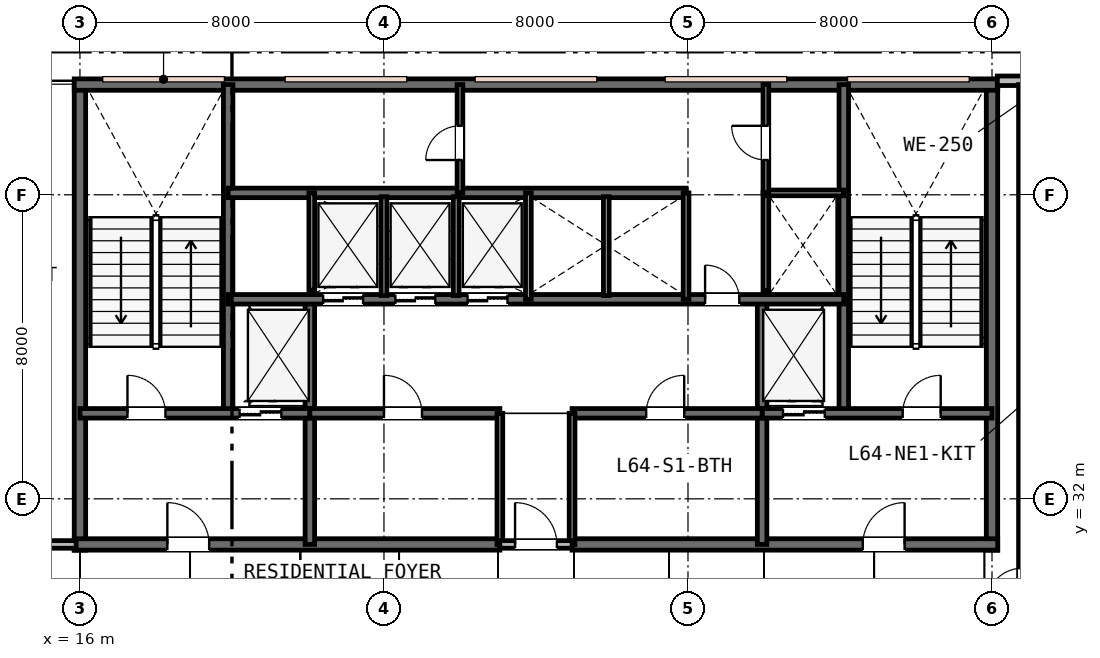
"""IFC4 building model, lengths in metres.
Left out: names, types, materials, properties, quantities, classifications, styles, units other than length and angle.
Written with IfcOpenShell. Run it as: python <this file> out.ifc"""

import sys

from ifc_helpers import new_model, si_unit, direction, frame, frame_2d, origin, place, context, subcontext, project, spatial, rectangle, extrude, element, fill, save


model = new_model("IFC4")
c1 = context("Model", 3, precision=1e-05, world=origin(), true_north=direction((0.0, 1.0)))
c2 = subcontext(c1, "Body", "Model", "MODEL_VIEW")
j1 = project(units=[si_unit("LENGTHUNIT", "METRE"), si_unit("PLANEANGLEUNIT", "RADIAN")], contexts=[c1])
p1 = place(None, origin())
s1 = spatial("IfcSite", under=j1, at=p1, CompositionType="ELEMENT")
p2 = place(p1, origin())
s2 = spatial("IfcBuilding", under=s1, at=p2, CompositionType="ELEMENT")
p3 = place(p2, frame((0.0, 0.0, 248.8)))
s3 = spatial("IfcBuildingStorey", under=s2, at=p3, CompositionType="ELEMENT", Elevation=248.8)
for number, where, z_axis, x_axis in (
    (1, (16.0, 30.65, 0.0), (0.0, 0.0, 1.0), (0.0, 1.0, 0.0)),
    (2, (40.0, 30.65, 0.0), (0.0, 0.0, 1.0), (0.0, 1.0, 0.0)),
):
    element("IfcWall", number, at=place(p3, frame(where, z_axis=z_axis, x_axis=x_axis)), inside=s3, PredefinedType="SHEAR", context=c2, shape_type="SweptSolid", body=[
        extrude(rectangle(XDim=12.3, YDim=0.3, at=frame_2d((6.15, 0.0))), origin(), (0.0, 0.0, 1.0), 3.8),
    ])
p4 = place(p3, frame((15.85, 42.9, 0.0), z_axis=(0.0, 0.0, 1.0), x_axis=(1.0, 0.0, 0.0)))
e3 = element("IfcWall", 3, at=p4, inside=s3, PredefinedType="SHEAR", context=c2, shape_type="SweptSolid", body=[
    extrude(rectangle(XDim=24.3, YDim=0.3, at=frame_2d((12.15, 0.0))), origin(), (0.0, 0.0, 1.0), 3.8),
])
p5 = place(p3, frame((15.85, 30.8, 0.0), z_axis=(0.0, 0.0, 1.0), x_axis=(1.0, 0.0, 0.0)))
e4 = element("IfcWall", 4, at=p5, inside=s3, PredefinedType="SHEAR", context=c2, shape_type="SweptSolid", body=[
    extrude(rectangle(XDim=11.2, YDim=0.3, at=frame_2d((5.6, 0.0))), origin(), (0.0, 0.0, 1.0), 3.8),
])
p6 = place(p5, frame((2.45, 0.0, 0.0)))
e5 = element("IfcOpeningElement", 5, at=p6, cuts=e4, PredefinedType="OPENING", context=c2, shape_type="SweptSolid", body=[
    extrude(rectangle(XDim=1.1, YDim=2.15, at=frame_2d((0.55, 1.075))), frame((0.0, 0.16, 0.0), z_axis=(0.0, -1.0, 0.0), x_axis=(1.0, 0.0, 0.0)), (0.0, 0.0, 1.0), 0.32),
])
p7 = place(p3, frame((28.95, 30.8, 0.0), z_axis=(0.0, 0.0, 1.0), x_axis=(1.0, 0.0, 0.0)))
e6 = element("IfcWall", 6, at=p7, inside=s3, PredefinedType="SHEAR", context=c2, shape_type="SweptSolid", body=[
    extrude(rectangle(XDim=11.2, YDim=0.3, at=frame_2d((5.6, 0.0))), origin(), (0.0, 0.0, 1.0), 3.8),
])
p8 = place(p7, frame((7.65, 0.0, 0.0)))
e7 = element("IfcOpeningElement", 7, at=p8, cuts=e6, PredefinedType="OPENING", context=c2, shape_type="SweptSolid", body=[
    extrude(rectangle(XDim=1.1, YDim=2.15, at=frame_2d((0.55, 1.075))), frame((0.0, 0.16, 0.0), z_axis=(0.0, -1.0, 0.0), x_axis=(1.0, 0.0, 0.0)), (0.0, 0.0, 1.0), 0.32),
])
for number, where, z_axis, x_axis in (
    (8, (19.9, 34.25, 0.0), (0.0, 0.0, 1.0), (0.0, 1.0, 0.0)),
    (9, (36.1, 34.25, 0.0), (0.0, 0.0, 1.0), (0.0, 1.0, 0.0)),
):
    element("IfcWall", number, at=place(p3, frame(where, z_axis=z_axis, x_axis=x_axis)), inside=s3, PredefinedType="SHEAR", context=c2, shape_type="SweptSolid", body=[
        extrude(rectangle(XDim=8.65, YDim=0.25, at=frame_2d((4.325, 0.0))), origin(), (0.0, 0.0, 1.0), 3.8),
    ])
for number, where, z_axis, x_axis in (
    (10, (22.05, 30.8, 0.0), (0.0, 0.0, 1.0), (0.0, 1.0, 0.0)),
    (11, (33.95, 30.8, 0.0), (0.0, 0.0, 1.0), (0.0, 1.0, 0.0)),
):
    element("IfcWall", number, at=place(p3, frame(where, z_axis=z_axis, x_axis=x_axis)), inside=s3, PredefinedType="SHEAR", context=c2, shape_type="SweptSolid", body=[
        extrude(rectangle(XDim=6.45, YDim=0.25, at=frame_2d((3.225, 0.0))), origin(), (0.0, 0.0, 1.0), 3.8),
    ])
p9 = place(p3, frame((16.0, 34.25, 0.0), z_axis=(0.0, 0.0, 1.0), x_axis=(1.0, 0.0, 0.0)))
e12 = element("IfcWall", 12, at=p9, inside=s3, PredefinedType="SHEAR", context=c2, shape_type="SweptSolid", body=[
    extrude(rectangle(XDim=6.05, YDim=0.25, at=frame_2d((3.025, 0.0))), origin(), (0.0, 0.0, 1.0), 3.8),
])
p10 = place(p9, frame((1.25, 0.0, 0.0)))
e13 = element("IfcOpeningElement", 13, at=p10, cuts=e12, PredefinedType="OPENING", context=c2, shape_type="SweptSolid", body=[
    extrude(rectangle(XDim=1.0, YDim=2.15, at=frame_2d((0.5, 1.075))), frame((0.0, 0.135, 0.0), z_axis=(0.0, -1.0, 0.0), x_axis=(1.0, 0.0, 0.0)), (0.0, 0.0, 1.0), 0.27),
])
p11 = place(p9, frame((4.2, 0.0, 0.0)))
e14 = element("IfcOpeningElement", 14, at=p11, cuts=e12, PredefinedType="OPENING", context=c2, shape_type="SweptSolid", body=[
    extrude(rectangle(XDim=1.1, YDim=2.15, at=frame_2d((0.55, 1.075))), frame((0.0, 0.135, 0.0), z_axis=(0.0, -1.0, 0.0), x_axis=(1.0, 0.0, 0.0)), (0.0, 0.0, 1.0), 0.27),
])
p12 = place(p3, frame((33.95, 34.25, 0.0), z_axis=(0.0, 0.0, 1.0), x_axis=(1.0, 0.0, 0.0)))
e15 = element("IfcWall", 15, at=p12, inside=s3, PredefinedType="SHEAR", context=c2, shape_type="SweptSolid", body=[
    extrude(rectangle(XDim=6.05, YDim=0.25, at=frame_2d((3.025, 0.0))), origin(), (0.0, 0.0, 1.0), 3.8),
])
p13 = place(p12, frame((3.7, 0.0, 0.0)))
e16 = element("IfcOpeningElement", 16, at=p13, cuts=e15, PredefinedType="OPENING", context=c2, shape_type="SweptSolid", body=[
    extrude(rectangle(XDim=1.0, YDim=2.15, at=frame_2d((0.5, 1.075))), frame((0.0, 0.135, 0.0), z_axis=(0.0, -1.0, 0.0), x_axis=(1.0, 0.0, 0.0)), (0.0, 0.0, 1.0), 0.27),
])
p14 = place(p12, frame((0.55, 0.0, 0.0)))
e17 = element("IfcOpeningElement", 17, at=p14, cuts=e15, PredefinedType="OPENING", context=c2, shape_type="SweptSolid", body=[
    extrude(rectangle(XDim=1.1, YDim=2.15, at=frame_2d((0.55, 1.075))), frame((0.0, 0.135, 0.0), z_axis=(0.0, -1.0, 0.0), x_axis=(1.0, 0.0, 0.0)), (0.0, 0.0, 1.0), 0.27),
])
p15 = place(p3, frame((22.05, 34.25, 0.0), z_axis=(0.0, 0.0, 1.0), x_axis=(1.0, 0.0, 0.0)))
e18 = element("IfcWall", 18, at=p15, inside=s3, PredefinedType="SHEAR", context=c2, shape_type="SweptSolid", body=[
    extrude(rectangle(XDim=5.0, YDim=0.25, at=frame_2d((2.5, 0.0))), origin(), (0.0, 0.0, 1.0), 3.8),
])
p16 = place(p15, frame((1.95, 0.0, 0.0)))
e19 = element("IfcOpeningElement", 19, at=p16, cuts=e18, PredefinedType="OPENING", context=c2, shape_type="SweptSolid", body=[
    extrude(rectangle(XDim=1.0, YDim=2.15, at=frame_2d((0.5, 1.075))), frame((0.0, 0.135, 0.0), z_axis=(0.0, -1.0, 0.0), x_axis=(1.0, 0.0, 0.0)), (0.0, 0.0, 1.0), 0.27),
])
p17 = place(p3, frame((28.95, 34.25, 0.0), z_axis=(0.0, 0.0, 1.0), x_axis=(1.0, 0.0, 0.0)))
e20 = element("IfcWall", 20, at=p17, inside=s3, PredefinedType="SHEAR", context=c2, shape_type="SweptSolid", body=[
    extrude(rectangle(XDim=5.0, YDim=0.25, at=frame_2d((2.5, 0.0))), origin(), (0.0, 0.0, 1.0), 3.8),
])
p18 = place(p17, frame((1.95, 0.0, 0.0)))
e21 = element("IfcOpeningElement", 21, at=p18, cuts=e20, PredefinedType="OPENING", context=c2, shape_type="SweptSolid", body=[
    extrude(rectangle(XDim=1.0, YDim=2.15, at=frame_2d((0.5, 1.075))), frame((0.0, 0.135, 0.0), z_axis=(0.0, -1.0, 0.0), x_axis=(1.0, 0.0, 0.0)), (0.0, 0.0, 1.0), 0.27),
])
p19 = place(p3, frame((19.9, 37.25, 0.0), z_axis=(0.0, 0.0, 1.0), x_axis=(1.0, 0.0, 0.0)))
e22 = element("IfcWall", 22, at=p19, inside=s3, PredefinedType="SHEAR", context=c2, shape_type="SweptSolid", body=[
    extrude(rectangle(XDim=16.2, YDim=0.25, at=frame_2d((8.1, 0.0))), origin(), (0.0, 0.0, 1.0), 3.8),
])
p20 = place(p19, frame((12.55, 0.0, 0.0)))
e23 = element("IfcOpeningElement", 23, at=p20, cuts=e22, PredefinedType="OPENING", context=c2, shape_type="SweptSolid", body=[
    extrude(rectangle(XDim=0.9, YDim=2.15, at=frame_2d((0.45, 1.075))), frame((0.0, 0.135, 0.0), z_axis=(0.0, -1.0, 0.0), x_axis=(1.0, 0.0, 0.0)), (0.0, 0.0, 1.0), 0.27),
])
p21 = place(p19, frame((2.5, 0.0, 0.0)))
e24 = element("IfcOpeningElement", 24, at=p21, cuts=e22, PredefinedType="OPENING", context=c2, shape_type="SweptSolid", body=[
    extrude(rectangle(XDim=1.05, YDim=2.15, at=frame_2d((0.525, 1.075))), frame((0.0, 0.135, 0.0), z_axis=(0.0, -1.0, 0.0), x_axis=(1.0, 0.0, 0.0)), (0.0, 0.0, 1.0), 0.27),
])
p22 = place(p19, frame((4.4, 0.0, 0.0)))
e25 = element("IfcOpeningElement", 25, at=p22, cuts=e22, PredefinedType="OPENING", context=c2, shape_type="SweptSolid", body=[
    extrude(rectangle(XDim=1.05, YDim=2.15, at=frame_2d((0.525, 1.075))), frame((0.0, 0.135, 0.0), z_axis=(0.0, -1.0, 0.0), x_axis=(1.0, 0.0, 0.0)), (0.0, 0.0, 1.0), 0.27),
])
p23 = place(p19, frame((6.3, 0.0, 0.0)))
e26 = element("IfcOpeningElement", 26, at=p23, cuts=e22, PredefinedType="OPENING", context=c2, shape_type="SweptSolid", body=[
    extrude(rectangle(XDim=1.05, YDim=2.15, at=frame_2d((0.525, 1.075))), frame((0.0, 0.135, 0.0), z_axis=(0.0, -1.0, 0.0), x_axis=(1.0, 0.0, 0.0)), (0.0, 0.0, 1.0), 0.27),
])
p24 = place(p3, frame((19.9, 40.05, 0.0), z_axis=(0.0, 0.0, 1.0), x_axis=(1.0, 0.0, 0.0)))
e27 = element("IfcWall", 27, at=p24, inside=s3, PredefinedType="SHEAR", context=c2, shape_type="SweptSolid", body=[
    extrude(rectangle(XDim=12.05, YDim=0.25, at=frame_2d((6.025, 0.0))), origin(), (0.0, 0.0, 1.0), 3.8),
])
p25 = place(p3, frame((43.0, 43.0, 0.0), z_axis=(0.0, 0.0, 1.0), x_axis=(-1.0, 0.0, 0.0)))
e28 = element("IfcWall", 28, at=p25, inside=s3, PredefinedType="STANDARD", context=c2, shape_type="SweptSolid", body=[
    extrude(rectangle(XDim=2.86, YDim=0.25, at=frame_2d((1.43, 0.0))), origin(), (0.0, 0.0, 1.0), 3.53),
])
p26 = place(p25, frame((0.51, 0.0, 0.85)))
e29 = element("IfcOpeningElement", 29, at=p26, cuts=e28, PredefinedType="OPENING", context=c2, shape_type="SweptSolid", body=[
    extrude(rectangle(XDim=1.2, YDim=1.6, at=frame_2d((0.6, 0.8))), frame((0.0, 0.135, 0.0), z_axis=(0.0, -1.0, 0.0), x_axis=(1.0, 0.0, 0.0)), (0.0, 0.0, 1.0), 0.27),
])
for number, where, z_axis, x_axis in (
    (30, (27.05, 30.8, 0.0), (0.0, 0.0, 1.0), (0.0, 1.0, 0.0)),
    (31, (28.95, 30.8, 0.0), (0.0, 0.0, 1.0), (0.0, 1.0, 0.0)),
):
    element("IfcWall", number, at=place(p3, frame(where, z_axis=z_axis, x_axis=x_axis)), inside=s3, PredefinedType="PLUMBINGWALL", context=c2, shape_type="SweptSolid", body=[
        extrude(rectangle(XDim=3.45, YDim=0.15, at=frame_2d((1.725, 0.0))), origin(), (0.0, 0.0, 1.0), 3.28),
    ])
p27 = place(p3, frame((27.05, 30.8, 0.0), z_axis=(0.0, 0.0, 1.0), x_axis=(1.0, 0.0, 0.0)))
e32 = element("IfcWall", 32, at=p27, inside=s3, PredefinedType="PARTITIONING", context=c2, shape_type="SweptSolid", body=[
    extrude(rectangle(XDim=1.9, YDim=0.2, at=frame_2d((0.95, 0.0))), origin(), (0.0, 0.0, 1.0), 3.28),
])
p28 = place(p27, frame((0.4, 0.0, 0.0)))
e33 = element("IfcOpeningElement", 33, at=p28, cuts=e32, PredefinedType="OPENING", context=c2, shape_type="SweptSolid", body=[
    extrude(rectangle(XDim=1.1, YDim=2.15, at=frame_2d((0.55, 1.075))), frame((0.0, 0.11, 0.0), z_axis=(0.0, -1.0, 0.0), x_axis=(1.0, 0.0, 0.0)), (0.0, 0.0, 1.0), 0.22),
])
p29 = place(p3, frame((22.1, 37.49, 0.0), z_axis=(0.0, 0.0, 1.0), x_axis=(0.0, 1.0, 0.0)))
e34 = element("IfcWall", 34, at=p29, inside=s3, PredefinedType="PLUMBINGWALL", context=c2, shape_type="SweptSolid", body=[
    extrude(rectangle(XDim=2.56, YDim=0.15, at=frame_2d((1.28, 0.0))), origin(), (0.0, 0.0, 1.0), 3.53),
])
p30 = place(p3, frame((27.8, 37.25, 0.0), z_axis=(0.0, 0.0, 1.0), x_axis=(0.0, 1.0, 0.0)))
e35 = element("IfcWall", 35, at=p30, inside=s3, PredefinedType="PLUMBINGWALL", context=c2, shape_type="SweptSolid", body=[
    extrude(rectangle(XDim=2.8, YDim=0.15, at=frame_2d((1.4, 0.0))), origin(), (0.0, 0.0, 1.0), 3.53),
])
for number, where, z_axis, x_axis in (
    (36, (24.0, 37.35, 0.0), (0.0, 0.0, 1.0), (0.0, 1.0, 0.0)),
    (37, (25.9, 37.35, 0.0), (0.0, 0.0, 1.0), (0.0, 1.0, 0.0)),
):
    element("IfcWall", number, at=place(p3, frame(where, z_axis=z_axis, x_axis=x_axis)), inside=s3, PredefinedType="PLUMBINGWALL", context=c2, shape_type="SweptSolid", body=[
        extrude(rectangle(XDim=2.6, YDim=0.15, at=frame_2d((1.3, 0.0))), origin(), (0.0, 0.0, 1.0), 3.53),
    ])
p31 = place(p3, frame((31.95, 37.25, 0.0), z_axis=(0.0, 0.0, 1.0), x_axis=(0.0, 1.0, 0.0)))
e38 = element("IfcWall", 38, at=p31, inside=s3, PredefinedType="PLUMBINGWALL", context=c2, shape_type="SweptSolid", body=[
    extrude(rectangle(XDim=2.8, YDim=0.15, at=frame_2d((1.4, 0.0))), origin(), (0.0, 0.0, 1.0), 3.53),
])
p32 = place(p3, frame((29.85, 37.35, 0.0), z_axis=(0.0, 0.0, 1.0), x_axis=(0.0, 1.0, 0.0)))
e39 = element("IfcWall", 39, at=p32, inside=s3, PredefinedType="PLUMBINGWALL", context=c2, shape_type="SweptSolid", body=[
    extrude(rectangle(XDim=2.6, YDim=0.15, at=frame_2d((1.3, 0.0))), origin(), (0.0, 0.0, 1.0), 3.53),
])
p33 = place(p3, frame((34.05, 37.473, 0.0), z_axis=(0.0, 0.0, 1.0), x_axis=(0.0, 1.0, 0.0)))
e40 = element("IfcWall", 40, at=p33, inside=s3, PredefinedType="PLUMBINGWALL", context=c2, shape_type="SweptSolid", body=[
    extrude(rectangle(XDim=2.577, YDim=0.15, at=frame_2d((1.288, 0.0))), origin(), (0.0, 0.0, 1.0), 3.53),
])
p34 = place(p3, frame((34.05, 40.05, 0.0), z_axis=(0.0, 0.0, 1.0), x_axis=(1.0, 0.0, 0.0)))
e41 = element("IfcWall", 41, at=p34, inside=s3, PredefinedType="PARTITIONING", context=c2, shape_type="SweptSolid", body=[
    extrude(rectangle(XDim=2.05, YDim=0.15, at=frame_2d((1.025, 0.0))), origin(), (0.0, 0.0, 1.0), 3.53),
])
p35 = place(p3, frame((34.05, 40.05, 0.0), z_axis=(0.0, 0.0, 1.0), x_axis=(0.0, 1.0, 0.0)))
e42 = element("IfcWall", 42, at=p35, inside=s3, PredefinedType="PARTITIONING", context=c2, shape_type="SweptSolid", body=[
    extrude(rectangle(XDim=2.85, YDim=0.15, at=frame_2d((1.425, 0.0))), origin(), (0.0, 0.0, 1.0), 3.53),
])
p36 = place(p35, frame((0.865, 0.0, 0.0)))
e43 = element("IfcOpeningElement", 43, at=p36, cuts=e42, PredefinedType="OPENING", context=c2, shape_type="SweptSolid", body=[
    extrude(rectangle(XDim=0.9, YDim=2.15, at=frame_2d((0.45, 1.075))), frame((0.0, 0.085, 0.0), z_axis=(0.0, -1.0, 0.0), x_axis=(1.0, 0.0, 0.0)), (0.0, 0.0, 1.0), 0.17),
])
p37 = place(p3, frame((26.0, 40.05, 0.0), z_axis=(0.0, 0.0, 1.0), x_axis=(0.0, 1.0, 0.0)))
e44 = element("IfcWall", 44, at=p37, inside=s3, PredefinedType="PARTITIONING", context=c2, shape_type="SweptSolid", body=[
    extrude(rectangle(XDim=2.85, YDim=0.15, at=frame_2d((1.425, 0.0))), origin(), (0.0, 0.0, 1.0), 3.53),
])
p38 = place(p37, frame((0.865, 0.0, 0.0)))
e45 = element("IfcOpeningElement", 45, at=p38, cuts=e44, PredefinedType="OPENING", context=c2, shape_type="SweptSolid", body=[
    extrude(rectangle(XDim=0.9, YDim=2.15, at=frame_2d((0.45, 1.075))), frame((0.0, 0.085, 0.0), z_axis=(0.0, -1.0, 0.0), x_axis=(1.0, 0.0, 0.0)), (0.0, 0.0, 1.0), 0.17),
])
p39 = place(p3, frame((9.6, 30.8, 0.0), z_axis=(0.0, 0.0, 1.0), x_axis=(1.0, 0.0, 0.0)))
e46 = element("IfcWall", 46, at=p39, inside=s3, PredefinedType="PARTITIONING", context=c2, shape_type="SweptSolid", body=[
    extrude(rectangle(XDim=6.3, YDim=0.2, at=frame_2d((3.15, 0.0))), origin(), (0.0, 0.0, 1.0), 3.16),
])
p40 = place(p39, frame((0.95, 0.0, 0.0)))
e47 = element("IfcOpeningElement", 47, at=p40, cuts=e46, PredefinedType="OPENING", context=c2, shape_type="SweptSolid", body=[
    extrude(rectangle(XDim=0.95, YDim=2.15, at=frame_2d((0.475, 1.075))), frame((0.0, 0.11, 0.0), z_axis=(0.0, -1.0, 0.0), x_axis=(1.0, 0.0, 0.0)), (0.0, 0.0, 1.0), 0.22),
])
p41 = place(p39, frame((4.1, 0.0, 0.0)))
e48 = element("IfcOpeningElement", 48, at=p41, cuts=e46, PredefinedType="OPENING", context=c2, shape_type="SweptSolid", body=[
    extrude(rectangle(XDim=0.95, YDim=2.15, at=frame_2d((0.475, 1.075))), frame((0.0, 0.11, 0.0), z_axis=(0.0, -1.0, 0.0), x_axis=(1.0, 0.0, 0.0)), (0.0, 0.0, 1.0), 0.22),
])
p42 = place(p3, frame((40.8, 28.6, 0.0), z_axis=(0.0, 0.0, 1.0), x_axis=(0.0, 1.0, 0.0)))
e49 = element("IfcWall", 49, at=p42, inside=s3, PredefinedType="PARTITIONING", context=c2, shape_type="SweptSolid", body=[
    extrude(rectangle(XDim=14.3, YDim=0.2, at=frame_2d((7.15, 0.0))), origin(), (0.0, 0.0, 1.0), 3.16),
])
p43 = place(p42, frame((0.625, 0.0, 0.0)))
e50 = element("IfcOpeningElement", 50, at=p43, cuts=e49, PredefinedType="OPENING", context=c2, shape_type="SweptSolid", body=[
    extrude(rectangle(XDim=0.95, YDim=2.15, at=frame_2d((0.475, 1.075))), frame((0.0, 0.11, 0.0), z_axis=(0.0, -1.0, 0.0), x_axis=(1.0, 0.0, 0.0)), (0.0, 0.0, 1.0), 0.22),
])
p44 = place(p28, origin())
e51 = element("IfcDoor", 51, at=p44, inside=s3, OperationType="SINGLE_SWING_LEFT", PredefinedType="DOOR", context=c2, shape_type="SweptSolid", body=[
    extrude(rectangle(XDim=1.1, YDim=2.15, at=frame_2d((0.55, 1.075))), frame((0.0, 0.025, 0.0), z_axis=(0.0, -1.0, 0.0), x_axis=(1.0, 0.0, 0.0)), (0.0, 0.0, 1.0), 0.05),
])
fill(e33, e51)
p45 = place(p10, origin())
e52 = element("IfcDoor", 52, at=p45, inside=s3, OperationType="SINGLE_SWING_LEFT", PredefinedType="DOOR", context=c2, shape_type="SweptSolid", body=[
    extrude(rectangle(XDim=1.0, YDim=2.15, at=frame_2d((0.5, 1.075))), frame((0.0, 0.025, 0.0), z_axis=(0.0, -1.0, 0.0), x_axis=(1.0, 0.0, 0.0)), (0.0, 0.0, 1.0), 0.05),
])
fill(e13, e52)
p46 = place(p13, origin())
e53 = element("IfcDoor", 53, at=p46, inside=s3, OperationType="SINGLE_SWING_RIGHT", PredefinedType="DOOR", context=c2, shape_type="SweptSolid", body=[
    extrude(rectangle(XDim=1.0, YDim=2.15, at=frame_2d((0.5, 1.075))), frame((0.0, 0.025, 0.0), z_axis=(0.0, -1.0, 0.0), x_axis=(1.0, 0.0, 0.0)), (0.0, 0.0, 1.0), 0.05),
])
fill(e16, e53)
p47 = place(p6, origin())
e54 = element("IfcDoor", 54, at=p47, inside=s3, OperationType="SINGLE_SWING_LEFT", PredefinedType="DOOR", context=c2, shape_type="SweptSolid", body=[
    extrude(rectangle(XDim=1.1, YDim=2.15, at=frame_2d((0.55, 1.075))), frame((0.0, 0.025, 0.0), z_axis=(0.0, -1.0, 0.0), x_axis=(1.0, 0.0, 0.0)), (0.0, 0.0, 1.0), 0.05),
])
fill(e5, e54)
p48 = place(p8, origin())
e55 = element("IfcDoor", 55, at=p48, inside=s3, OperationType="SINGLE_SWING_RIGHT", PredefinedType="DOOR", context=c2, shape_type="SweptSolid", body=[
    extrude(rectangle(XDim=1.1, YDim=2.15, at=frame_2d((0.55, 1.075))), frame((0.0, 0.025, 0.0), z_axis=(0.0, -1.0, 0.0), x_axis=(1.0, 0.0, 0.0)), (0.0, 0.0, 1.0), 0.05),
])
fill(e7, e55)
p49 = place(p16, origin())
e56 = element("IfcDoor", 56, at=p49, inside=s3, OperationType="SINGLE_SWING_LEFT", PredefinedType="DOOR", context=c2, shape_type="SweptSolid", body=[
    extrude(rectangle(XDim=1.0, YDim=2.15, at=frame_2d((0.5, 1.075))), frame((0.0, 0.025, 0.0), z_axis=(0.0, -1.0, 0.0), x_axis=(1.0, 0.0, 0.0)), (0.0, 0.0, 1.0), 0.05),
])
fill(e19, e56)
p50 = place(p18, origin())
e57 = element("IfcDoor", 57, at=p50, inside=s3, OperationType="SINGLE_SWING_RIGHT", PredefinedType="DOOR", context=c2, shape_type="SweptSolid", body=[
    extrude(rectangle(XDim=1.0, YDim=2.15, at=frame_2d((0.5, 1.075))), frame((0.0, 0.025, 0.0), z_axis=(0.0, -1.0, 0.0), x_axis=(1.0, 0.0, 0.0)), (0.0, 0.0, 1.0), 0.05),
])
fill(e21, e57)
p51 = place(p20, origin())
e58 = element("IfcDoor", 58, at=p51, inside=s3, OperationType="SINGLE_SWING_LEFT", PredefinedType="DOOR", context=c2, shape_type="SweptSolid", body=[
    extrude(rectangle(XDim=0.9, YDim=2.15, at=frame_2d((0.45, 1.075))), frame((0.0, 0.025, 0.0), z_axis=(0.0, -1.0, 0.0), x_axis=(1.0, 0.0, 0.0)), (0.0, 0.0, 1.0), 0.05),
])
fill(e23, e58)
p52 = place(p36, origin())
e59 = element("IfcDoor", 59, at=p52, inside=s3, OperationType="SINGLE_SWING_RIGHT", PredefinedType="DOOR", context=c2, shape_type="SweptSolid", body=[
    extrude(rectangle(XDim=0.9, YDim=2.15, at=frame_2d((0.45, 1.075))), frame((0.0, 0.025, 0.0), z_axis=(0.0, -1.0, 0.0), x_axis=(1.0, 0.0, 0.0)), (0.0, 0.0, 1.0), 0.05),
])
fill(e43, e59)
p53 = place(p38, origin())
e60 = element("IfcDoor", 60, at=p53, inside=s3, OperationType="SINGLE_SWING_LEFT", PredefinedType="DOOR", context=c2, shape_type="SweptSolid", body=[
    extrude(rectangle(XDim=0.9, YDim=2.15, at=frame_2d((0.45, 1.075))), frame((0.0, 0.025, 0.0), z_axis=(0.0, -1.0, 0.0), x_axis=(1.0, 0.0, 0.0)), (0.0, 0.0, 1.0), 0.05),
])
fill(e45, e60)
p54 = place(p11, origin())
e61 = element("IfcDoor", 61, at=p54, inside=s3, OperationType="DOUBLE_DOOR_SLIDING", PredefinedType="DOOR", context=c2, shape_type="SweptSolid", body=[
    extrude(rectangle(XDim=1.1, YDim=2.15, at=frame_2d((0.55, 1.075))), frame((0.0, 0.025, 0.0), z_axis=(0.0, -1.0, 0.0), x_axis=(1.0, 0.0, 0.0)), (0.0, 0.0, 1.0), 0.05),
])
fill(e14, e61)
p55 = place(p14, origin())
e62 = element("IfcDoor", 62, at=p55, inside=s3, OperationType="DOUBLE_DOOR_SLIDING", PredefinedType="DOOR", context=c2, shape_type="SweptSolid", body=[
    extrude(rectangle(XDim=1.1, YDim=2.15, at=frame_2d((0.55, 1.075))), frame((0.0, 0.025, 0.0), z_axis=(0.0, -1.0, 0.0), x_axis=(1.0, 0.0, 0.0)), (0.0, 0.0, 1.0), 0.05),
])
fill(e17, e62)
p56 = place(p21, origin())
e63 = element("IfcDoor", 63, at=p56, inside=s3, OperationType="DOUBLE_DOOR_SLIDING", PredefinedType="DOOR", context=c2, shape_type="SweptSolid", body=[
    extrude(rectangle(XDim=1.05, YDim=2.15, at=frame_2d((0.525, 1.075))), frame((0.0, 0.025, 0.0), z_axis=(0.0, -1.0, 0.0), x_axis=(1.0, 0.0, 0.0)), (0.0, 0.0, 1.0), 0.05),
])
fill(e24, e63)
p57 = place(p22, origin())
e64 = element("IfcDoor", 64, at=p57, inside=s3, OperationType="DOUBLE_DOOR_SLIDING", PredefinedType="DOOR", context=c2, shape_type="SweptSolid", body=[
    extrude(rectangle(XDim=1.05, YDim=2.15, at=frame_2d((0.525, 1.075))), frame((0.0, 0.025, 0.0), z_axis=(0.0, -1.0, 0.0), x_axis=(1.0, 0.0, 0.0)), (0.0, 0.0, 1.0), 0.05),
])
fill(e25, e64)
p58 = place(p23, origin())
e65 = element("IfcDoor", 65, at=p58, inside=s3, OperationType="DOUBLE_DOOR_SLIDING", PredefinedType="DOOR", context=c2, shape_type="SweptSolid", body=[
    extrude(rectangle(XDim=1.05, YDim=2.15, at=frame_2d((0.525, 1.075))), frame((0.0, 0.025, 0.0), z_axis=(0.0, -1.0, 0.0), x_axis=(1.0, 0.0, 0.0)), (0.0, 0.0, 1.0), 0.05),
])
fill(e26, e65)
save(model, sys.argv[1])
